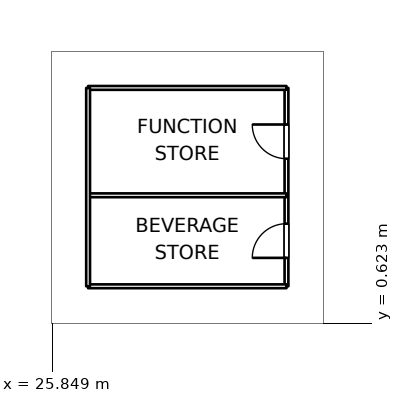
"""IFC4 building model, lengths in metres.
Left out: names, types, materials, properties, quantities, classifications, styles, units other than length and angle.
Written with IfcOpenShell. Run it as: python <this file> out.ifc"""

import sys

from ifc_helpers import new_model, si_unit, direction, frame, frame_2d, origin, place, context, subcontext, project, spatial, rectangle, extrude, element, fill, save


model = new_model("IFC4")
c1 = context("Model", 3, precision=1e-05, world=origin(), true_north=direction((0.0, 1.0)))
c2 = subcontext(c1, "Body", "Model", "MODEL_VIEW")
j1 = project(units=[si_unit("LENGTHUNIT", "METRE"), si_unit("PLANEANGLEUNIT", "RADIAN")], contexts=[c1])
p1 = place(None, origin())
s1 = spatial("IfcSite", under=j1, at=p1, CompositionType="ELEMENT")
p2 = place(p1, origin())
s2 = spatial("IfcBuilding", under=s1, at=p2, CompositionType="ELEMENT")
p3 = place(p2, frame((0.0, 0.0, 16.0)))
s3 = spatial("IfcBuildingStorey", under=s2, at=p3, CompositionType="ELEMENT", Elevation=16.0)
p4 = place(p3, frame((26.79, 1.59, 0.0), z_axis=(0.0, 0.0, 1.0), x_axis=(1.0, 0.0, 0.0)))
e1 = element("IfcWall", 1, at=p4, inside=s3, PredefinedType="PARTITIONING", context=c2, shape_type="SweptSolid", body=[
    extrude(rectangle(XDim=5.22, YDim=0.1, at=frame_2d((2.61, 0.0))), origin(), (0.0, 0.0, 1.0), 4.7),
])
p5 = place(p3, frame((32.01, 1.59, 0.0), z_axis=(0.0, 0.0, 1.0), x_axis=(0.0, 1.0, 0.0)))
e2 = element("IfcWall", 2, at=p5, inside=s3, PredefinedType="PARTITIONING", context=c2, shape_type="SweptSolid", body=[
    extrude(rectangle(XDim=5.22, YDim=0.1, at=frame_2d((2.61, 0.0))), origin(), (0.0, 0.0, 1.0), 4.7),
])
p6 = place(p5, frame((0.747, 0.0, 0.0)))
e3 = element("IfcOpeningElement", 3, at=p6, cuts=e2, PredefinedType="OPENING", context=c2, shape_type="SweptSolid", body=[
    extrude(rectangle(XDim=0.9, YDim=2.1, at=frame_2d((0.45, 1.05))), frame((0.0, 0.06, 0.0), z_axis=(0.0, -1.0, 0.0), x_axis=(1.0, 0.0, 0.0)), (0.0, 0.0, 1.0), 0.12),
])
p7 = place(p5, frame((3.357, 0.0, 0.0)))
e4 = element("IfcOpeningElement", 4, at=p7, cuts=e2, PredefinedType="OPENING", context=c2, shape_type="SweptSolid", body=[
    extrude(rectangle(XDim=0.9, YDim=2.1, at=frame_2d((0.45, 1.05))), frame((0.0, 0.06, 0.0), z_axis=(0.0, -1.0, 0.0), x_axis=(1.0, 0.0, 0.0)), (0.0, 0.0, 1.0), 0.12),
])
for number, where, z_axis, x_axis in (
    (5, (32.01, 6.81, 0.0), (0.0, 0.0, 1.0), (-1.0, 0.0, 0.0)),
    (6, (26.79, 6.81, 0.0), (0.0, 0.0, 1.0), (0.0, -1.0, 0.0)),
    (7, (26.79, 3.984, 0.0), (0.0, 0.0, 1.0), (1.0, 0.0, 0.0)),
):
    element("IfcWall", number, at=place(p3, frame(where, z_axis=z_axis, x_axis=x_axis)), inside=s3, PredefinedType="PARTITIONING", context=c2, shape_type="SweptSolid", body=[
        extrude(rectangle(XDim=5.22, YDim=0.1, at=frame_2d((2.61, 0.0))), origin(), (0.0, 0.0, 1.0), 4.7),
    ])
p8 = place(p3, frame((9.45, 6.495, 0.0), z_axis=(0.0, 0.0, 1.0), x_axis=(0.866025301493, -0.500000177174, 0.0)))
e8 = element("IfcWall", 8, at=p8, inside=s3, PredefinedType="SOLIDWALL", context=c2, shape_type="SweptSolid", body=[
    extrude(rectangle(XDim=43.095, YDim=0.3, at=frame_2d((21.548, 0.0))), origin(), (0.0, 0.0, 1.0), 4.7),
])
p9 = place(p8, frame((26.595, 0.0, 0.0)))
e9 = element("IfcOpeningElement", 9, at=p9, cuts=e8, PredefinedType="OPENING", context=c2, shape_type="SweptSolid", body=[
    extrude(rectangle(XDim=1.8, YDim=2.4, at=frame_2d((0.9, 1.2))), frame((0.0, 0.16, 0.0), z_axis=(0.0, -1.0, 0.0), x_axis=(1.0, 0.0, 0.0)), (0.0, 0.0, 1.0), 0.32),
])
p10 = place(p6, origin())
e10 = element("IfcDoor", 10, at=p10, inside=s3, OperationType="SINGLE_SWING_LEFT", PredefinedType="DOOR", context=c2, shape_type="SweptSolid", body=[
    extrude(rectangle(XDim=0.9, YDim=2.1, at=frame_2d((0.45, 1.05))), frame((0.0, 0.025, 0.0), z_axis=(0.0, -1.0, 0.0), x_axis=(1.0, 0.0, 0.0)), (0.0, 0.0, 1.0), 0.05),
])
fill(e3, e10)
p11 = place(p7, origin())
e11 = element("IfcDoor", 11, at=p11, inside=s3, OperationType="SINGLE_SWING_RIGHT", PredefinedType="DOOR", context=c2, shape_type="SweptSolid", body=[
    extrude(rectangle(XDim=0.9, YDim=2.1, at=frame_2d((0.45, 1.05))), frame((0.0, 0.025, 0.0), z_axis=(0.0, -1.0, 0.0), x_axis=(1.0, 0.0, 0.0)), (0.0, 0.0, 1.0), 0.05),
])
fill(e4, e11)
save(model, sys.argv[1])
